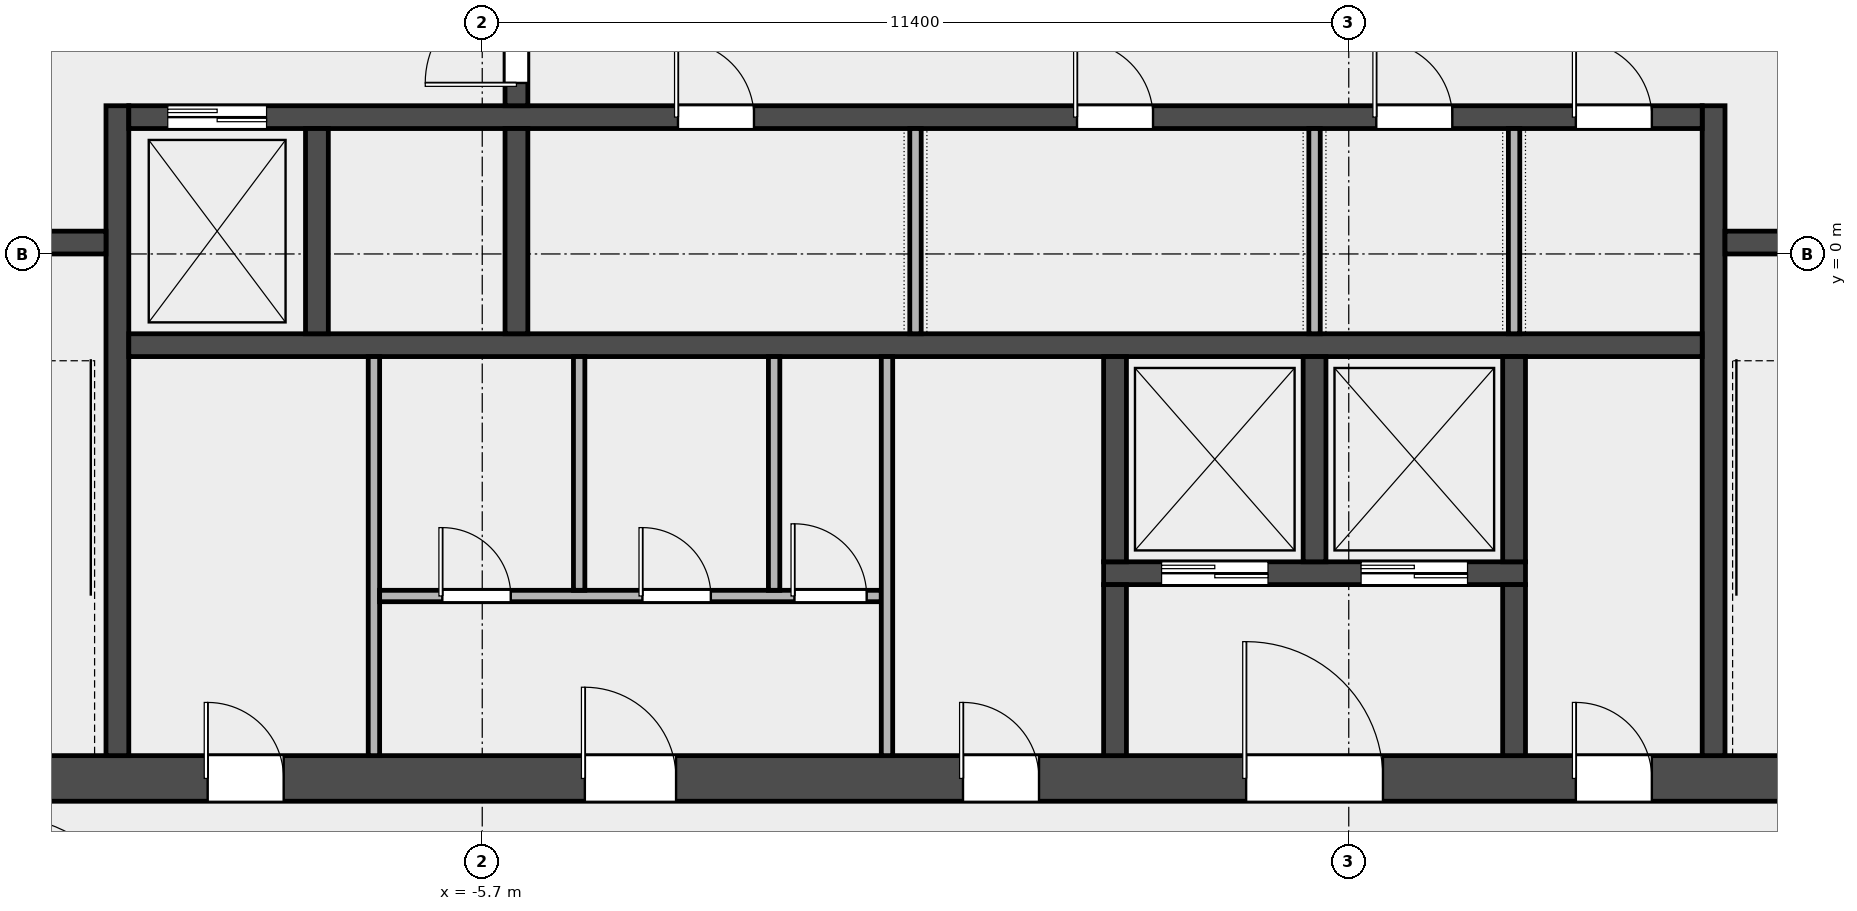
"""IFC4 building model, lengths in metres.
Left out: names, types, materials, properties, quantities, classifications, styles, units other than length and angle.
Written with IfcOpenShell. Run it as: python <this file> out.ifc"""

import sys

from ifc_helpers import new_model, si_unit, direction, frame, frame_2d, origin, place, context, subcontext, project, spatial, rectangle, extrude, element, fill, save


model = new_model("IFC4")
c1 = context("Model", 3, precision=1e-05, world=origin(), true_north=direction((0.0, 1.0)))
c2 = subcontext(c1, "Body", "Model", "MODEL_VIEW")
j1 = project(units=[si_unit("LENGTHUNIT", "METRE"), si_unit("PLANEANGLEUNIT", "RADIAN")], contexts=[c1])
p1 = place(None, origin())
s1 = spatial("IfcSite", under=j1, at=p1, CompositionType="ELEMENT")
p2 = place(p1, origin())
s2 = spatial("IfcBuilding", under=s1, at=p2, CompositionType="ELEMENT")
p3 = place(p2, frame((0.0, 0.0, 211.0)))
s3 = spatial("IfcBuildingStorey", under=s2, at=p3, CompositionType="ELEMENT", Elevation=211.0)
p4 = place(p3, frame((-14.4, -6.9, 0.0), z_axis=(0.0, 0.0, 1.0), x_axis=(1.0, 0.0, 0.0)))
e1 = element("IfcWall", 1, at=p4, inside=s3, PredefinedType="SHEAR", context=c2, shape_type="SweptSolid", body=[
    extrude(rectangle(XDim=28.8, YDim=0.6, at=frame_2d((14.4, 0.0))), origin(), (0.0, 0.0, 1.0), 3.7),
])
p5 = place(p4, frame((5.087, 0.0, 0.0)))
e2 = element("IfcOpeningElement", 2, at=p5, cuts=e1, PredefinedType="OPENING", context=c2, shape_type="SweptSolid", body=[
    extrude(rectangle(XDim=1.0, YDim=2.1, at=frame_2d((0.5, 1.05))), frame((0.0, 0.312, 0.0), z_axis=(0.0, -1.0, 0.0), x_axis=(1.0, 0.0, 0.0)), (0.0, 0.0, 1.0), 0.624),
])
p6 = place(p4, frame((10.05, 0.0, 0.0)))
e3 = element("IfcOpeningElement", 3, at=p6, cuts=e1, PredefinedType="OPENING", context=c2, shape_type="SweptSolid", body=[
    extrude(rectangle(XDim=1.2, YDim=2.1, at=frame_2d((0.6, 1.05))), frame((0.0, 0.312, 0.0), z_axis=(0.0, -1.0, 0.0), x_axis=(1.0, 0.0, 0.0)), (0.0, 0.0, 1.0), 0.624),
])
p7 = place(p4, frame((15.025, 0.0, 0.0)))
e4 = element("IfcOpeningElement", 4, at=p7, cuts=e1, PredefinedType="OPENING", context=c2, shape_type="SweptSolid", body=[
    extrude(rectangle(XDim=1.0, YDim=2.1, at=frame_2d((0.5, 1.05))), frame((0.0, 0.312, 0.0), z_axis=(0.0, -1.0, 0.0), x_axis=(1.0, 0.0, 0.0)), (0.0, 0.0, 1.0), 0.624),
])
p8 = place(p4, frame((18.75, 0.0, 0.0)))
e5 = element("IfcOpeningElement", 5, at=p8, cuts=e1, PredefinedType="OPENING", context=c2, shape_type="SweptSolid", body=[
    extrude(rectangle(XDim=1.8, YDim=2.1, at=frame_2d((0.9, 1.05))), frame((0.0, 0.312, 0.0), z_axis=(0.0, -1.0, 0.0), x_axis=(1.0, 0.0, 0.0)), (0.0, 0.0, 1.0), 0.624),
])
p9 = place(p4, frame((23.087, 0.0, 0.0)))
e6 = element("IfcOpeningElement", 6, at=p9, cuts=e1, PredefinedType="OPENING", context=c2, shape_type="SweptSolid", body=[
    extrude(rectangle(XDim=1.0, YDim=2.1, at=frame_2d((0.5, 1.05))), frame((0.0, 0.312, 0.0), z_axis=(0.0, -1.0, 0.0), x_axis=(1.0, 0.0, 0.0)), (0.0, 0.0, 1.0), 0.624),
])
for number, where, z_axis, x_axis in (
    (7, (-10.5, -6.6, 0.0), (0.0, 0.0, 1.0), (0.0, 1.0, 0.0)),
    (8, (10.5, -6.6, 0.0), (0.0, 0.0, 1.0), (0.0, 1.0, 0.0)),
):
    element("IfcWall", number, at=place(p3, frame(where, z_axis=z_axis, x_axis=x_axis)), inside=s3, PredefinedType="SHEAR", context=c2, shape_type="SweptSolid", body=[
        extrude(rectangle(XDim=8.55, YDim=0.3, at=frame_2d((4.275, 0.0))), origin(), (0.0, 0.0, 1.0), 3.7),
    ])
p10 = place(p3, frame((-13.8, 0.15, 0.0), z_axis=(0.0, 0.0, 1.0), x_axis=(1.0, 0.0, 0.0)))
e9 = element("IfcWall", 9, at=p10, inside=s3, PredefinedType="SOLIDWALL", context=c2, shape_type="SweptSolid", body=[
    extrude(rectangle(XDim=3.15, YDim=0.3, at=frame_2d((1.575, 0.0))), origin(), (0.0, 0.0, 1.0), 3.7),
])
p11 = place(p10, frame((0.975, 0.0, 0.0)))
e10 = element("IfcOpeningElement", 10, at=p11, cuts=e9, PredefinedType="OPENING", context=c2, shape_type="SweptSolid", body=[
    extrude(rectangle(XDim=1.1, YDim=2.1, at=frame_2d((0.55, 1.05))), frame((0.0, 0.162, 0.0), z_axis=(0.0, -1.0, 0.0), x_axis=(1.0, 0.0, 0.0)), (0.0, 0.0, 1.0), 0.324),
])
p12 = place(p3, frame((10.65, 0.15, 0.0), z_axis=(0.0, 0.0, 1.0), x_axis=(1.0, 0.0, 0.0)))
e11 = element("IfcWall", 11, at=p12, inside=s3, PredefinedType="SOLIDWALL", context=c2, shape_type="SweptSolid", body=[
    extrude(rectangle(XDim=3.15, YDim=0.3, at=frame_2d((1.575, 0.0))), origin(), (0.0, 0.0, 1.0), 3.7),
])
p13 = place(p12, frame((1.025, 0.0, 0.0)))
e12 = element("IfcOpeningElement", 12, at=p13, cuts=e11, PredefinedType="OPENING", context=c2, shape_type="SweptSolid", body=[
    extrude(rectangle(XDim=1.1, YDim=2.1, at=frame_2d((0.55, 1.05))), frame((0.0, 0.162, 0.0), z_axis=(0.0, -1.0, 0.0), x_axis=(1.0, 0.0, 0.0)), (0.0, 0.0, 1.0), 0.324),
])
p14 = place(p3, frame((-10.35, -1.2, 0.0), z_axis=(0.0, 0.0, 1.0), x_axis=(1.0, 0.0, 0.0)))
e13 = element("IfcWall", 13, at=p14, inside=s3, PredefinedType="SOLIDWALL", context=c2, shape_type="SweptSolid", body=[
    extrude(rectangle(XDim=20.7, YDim=0.3, at=frame_2d((10.35, 0.0))), origin(), (0.0, 0.0, 1.0), 3.7),
])
p15 = place(p3, frame((-10.35, 1.8, 0.0), z_axis=(0.0, 0.0, 1.0), x_axis=(1.0, 0.0, 0.0)))
e14 = element("IfcWall", 14, at=p15, inside=s3, PredefinedType="SOLIDWALL", context=c2, shape_type="SweptSolid", body=[
    extrude(rectangle(XDim=20.7, YDim=0.3, at=frame_2d((10.35, 0.0))), origin(), (0.0, 0.0, 1.0), 3.7),
])
p16 = place(p15, frame((0.512, 0.0, 0.0)))
e15 = element("IfcOpeningElement", 15, at=p16, cuts=e14, PredefinedType="OPENING", context=c2, shape_type="SweptSolid", body=[
    extrude(rectangle(XDim=1.3, YDim=2.1, at=frame_2d((0.65, 1.05))), frame((0.0, 0.162, 0.0), z_axis=(0.0, -1.0, 0.0), x_axis=(1.0, 0.0, 0.0)), (0.0, 0.0, 1.0), 0.324),
])
p17 = place(p15, frame((7.225, 0.0, 0.0)))
e16 = element("IfcOpeningElement", 16, at=p17, cuts=e14, PredefinedType="OPENING", context=c2, shape_type="SweptSolid", body=[
    extrude(rectangle(XDim=1.0, YDim=2.1, at=frame_2d((0.5, 1.05))), frame((0.0, 0.162, 0.0), z_axis=(0.0, -1.0, 0.0), x_axis=(1.0, 0.0, 0.0)), (0.0, 0.0, 1.0), 0.324),
])
p18 = place(p15, frame((12.475, 0.0, 0.0)))
e17 = element("IfcOpeningElement", 17, at=p18, cuts=e14, PredefinedType="OPENING", context=c2, shape_type="SweptSolid", body=[
    extrude(rectangle(XDim=1.0, YDim=2.1, at=frame_2d((0.5, 1.05))), frame((0.0, 0.162, 0.0), z_axis=(0.0, -1.0, 0.0), x_axis=(1.0, 0.0, 0.0)), (0.0, 0.0, 1.0), 0.324),
])
p19 = place(p15, frame((16.413, 0.0, 0.0)))
e18 = element("IfcOpeningElement", 18, at=p19, cuts=e14, PredefinedType="OPENING", context=c2, shape_type="SweptSolid", body=[
    extrude(rectangle(XDim=1.0, YDim=2.1, at=frame_2d((0.5, 1.05))), frame((0.0, 0.162, 0.0), z_axis=(0.0, -1.0, 0.0), x_axis=(1.0, 0.0, 0.0)), (0.0, 0.0, 1.0), 0.324),
])
p20 = place(p15, frame((19.038, 0.0, 0.0)))
e19 = element("IfcOpeningElement", 19, at=p20, cuts=e14, PredefinedType="OPENING", context=c2, shape_type="SweptSolid", body=[
    extrude(rectangle(XDim=1.0, YDim=2.1, at=frame_2d((0.5, 1.05))), frame((0.0, 0.162, 0.0), z_axis=(0.0, -1.0, 0.0), x_axis=(1.0, 0.0, 0.0)), (0.0, 0.0, 1.0), 0.324),
])
for number, where, z_axis, x_axis in (
    (20, (-7.875, -1.05, 0.0), (0.0, 0.0, 1.0), (0.0, 1.0, 0.0)),
    (21, (-5.25, -1.05, 0.0), (0.0, 0.0, 1.0), (0.0, 1.0, 0.0)),
):
    element("IfcWall", number, at=place(p3, frame(where, z_axis=z_axis, x_axis=x_axis)), inside=s3, PredefinedType="SOLIDWALL", context=c2, shape_type="SweptSolid", body=[
        extrude(rectangle(XDim=2.7, YDim=0.3, at=frame_2d((1.35, 0.0))), origin(), (0.0, 0.0, 1.0), 3.7),
    ])
p21 = place(p3, frame((-5.25, 1.95, 0.0), z_axis=(0.0, 0.0, 1.0), x_axis=(0.0, 1.0, 0.0)))
e22 = element("IfcWall", 22, at=p21, inside=s3, PredefinedType="SOLIDWALL", context=c2, shape_type="SweptSolid", body=[
    extrude(rectangle(XDim=3.3, YDim=0.3, at=frame_2d((1.65, 0.0))), origin(), (0.0, 0.0, 1.0), 3.7),
])
p22 = place(p21, frame((0.3, 0.0, 0.0)))
e23 = element("IfcOpeningElement", 23, at=p22, cuts=e22, PredefinedType="OPENING", context=c2, shape_type="SweptSolid", body=[
    extrude(rectangle(XDim=1.2, YDim=2.1, at=frame_2d((0.6, 1.05))), frame((0.0, 0.162, 0.0), z_axis=(0.0, -1.0, 0.0), x_axis=(1.0, 0.0, 0.0)), (0.0, 0.0, 1.0), 0.324),
])
p23 = place(p21, frame((1.8, 0.0, 0.0)))
e24 = element("IfcOpeningElement", 24, at=p23, cuts=e22, PredefinedType="OPENING", context=c2, shape_type="SweptSolid", body=[
    extrude(rectangle(XDim=1.2, YDim=2.1, at=frame_2d((0.6, 1.05))), frame((0.0, 0.162, 0.0), z_axis=(0.0, -1.0, 0.0), x_axis=(1.0, 0.0, 0.0)), (0.0, 0.0, 1.0), 0.324),
])
p24 = place(p3, frame((2.475, -4.2, 0.0), z_axis=(0.0, 0.0, 1.0), x_axis=(1.0, 0.0, 0.0)))
e25 = element("IfcWall", 25, at=p24, inside=s3, PredefinedType="SOLIDWALL", context=c2, shape_type="SweptSolid", body=[
    extrude(rectangle(XDim=5.55, YDim=0.3, at=frame_2d((2.775, 0.0))), origin(), (0.0, 0.0, 1.0), 3.7),
])
p25 = place(p24, frame((0.762, 0.0, 0.0)))
e26 = element("IfcOpeningElement", 26, at=p25, cuts=e25, PredefinedType="OPENING", context=c2, shape_type="SweptSolid", body=[
    extrude(rectangle(XDim=1.4, YDim=2.1, at=frame_2d((0.7, 1.05))), frame((0.0, 0.162, 0.0), z_axis=(0.0, -1.0, 0.0), x_axis=(1.0, 0.0, 0.0)), (0.0, 0.0, 1.0), 0.324),
])
p26 = place(p24, frame((3.387, 0.0, 0.0)))
e27 = element("IfcOpeningElement", 27, at=p26, cuts=e25, PredefinedType="OPENING", context=c2, shape_type="SweptSolid", body=[
    extrude(rectangle(XDim=1.4, YDim=2.1, at=frame_2d((0.7, 1.05))), frame((0.0, 0.162, 0.0), z_axis=(0.0, -1.0, 0.0), x_axis=(1.0, 0.0, 0.0)), (0.0, 0.0, 1.0), 0.324),
])
p27 = place(p3, frame((2.625, -4.05, 0.0), z_axis=(0.0, 0.0, 1.0), x_axis=(0.0, 1.0, 0.0)))
e28 = element("IfcWall", 28, at=p27, inside=s3, PredefinedType="SOLIDWALL", context=c2, shape_type="SweptSolid", body=[
    extrude(rectangle(XDim=2.7, YDim=0.3, at=frame_2d((1.35, 0.0))), origin(), (0.0, 0.0, 1.0), 3.7),
])
p28 = place(p3, frame((2.625, -6.6, 0.0), z_axis=(0.0, 0.0, 1.0), x_axis=(0.0, 1.0, 0.0)))
e29 = element("IfcWall", 29, at=p28, inside=s3, PredefinedType="SOLIDWALL", context=c2, shape_type="SweptSolid", body=[
    extrude(rectangle(XDim=2.25, YDim=0.3, at=frame_2d((1.125, 0.0))), origin(), (0.0, 0.0, 1.0), 3.7),
])
for number, where, z_axis, x_axis in (
    (30, (5.25, -4.05, 0.0), (0.0, 0.0, 1.0), (0.0, 1.0, 0.0)),
    (31, (7.875, -4.05, 0.0), (0.0, 0.0, 1.0), (0.0, 1.0, 0.0)),
):
    element("IfcWall", number, at=place(p3, frame(where, z_axis=z_axis, x_axis=x_axis)), inside=s3, PredefinedType="SOLIDWALL", context=c2, shape_type="SweptSolid", body=[
        extrude(rectangle(XDim=2.7, YDim=0.3, at=frame_2d((1.35, 0.0))), origin(), (0.0, 0.0, 1.0), 3.7),
    ])
p29 = place(p3, frame((7.875, -6.6, 0.0), z_axis=(0.0, 0.0, 1.0), x_axis=(0.0, 1.0, 0.0)))
e32 = element("IfcWall", 32, at=p29, inside=s3, PredefinedType="SOLIDWALL", context=c2, shape_type="SweptSolid", body=[
    extrude(rectangle(XDim=2.25, YDim=0.3, at=frame_2d((1.125, 0.0))), origin(), (0.0, 0.0, 1.0), 3.7),
])
p30 = place(p3, frame((-7.125, -6.6, 0.0), z_axis=(0.0, 0.0, 1.0), x_axis=(0.0, 1.0, 0.0)))
e33 = element("IfcWall", 33, at=p30, inside=s3, PredefinedType="PARTITIONING", context=c2, shape_type="SweptSolid", body=[
    extrude(rectangle(XDim=5.25, YDim=0.15, at=frame_2d((2.625, 0.0))), origin(), (0.0, 0.0, 1.0), 3.7),
])
p31 = place(p3, frame((-7.05, -4.5, 0.0), z_axis=(0.0, 0.0, 1.0), x_axis=(1.0, 0.0, 0.0)))
e34 = element("IfcWall", 34, at=p31, inside=s3, PredefinedType="PARTITIONING", context=c2, shape_type="SweptSolid", body=[
    extrude(rectangle(XDim=6.6, YDim=0.15, at=frame_2d((3.3, 0.0))), origin(), (0.0, 0.0, 1.0), 3.7),
])
p32 = place(p31, frame((0.825, 0.0, 0.0)))
e35 = element("IfcOpeningElement", 35, at=p32, cuts=e34, PredefinedType="OPENING", context=c2, shape_type="SweptSolid", body=[
    extrude(rectangle(XDim=0.9, YDim=2.1, at=frame_2d((0.45, 1.05))), frame((0.0, 0.087, 0.0), z_axis=(0.0, -1.0, 0.0), x_axis=(1.0, 0.0, 0.0)), (0.0, 0.0, 1.0), 0.174),
])
p33 = place(p31, frame((3.458, 0.0, 0.0)))
e36 = element("IfcOpeningElement", 36, at=p33, cuts=e34, PredefinedType="OPENING", context=c2, shape_type="SweptSolid", body=[
    extrude(rectangle(XDim=0.9, YDim=2.1, at=frame_2d((0.45, 1.05))), frame((0.0, 0.087, 0.0), z_axis=(0.0, -1.0, 0.0), x_axis=(1.0, 0.0, 0.0)), (0.0, 0.0, 1.0), 0.174),
])
p34 = place(p31, frame((5.458, 0.0, 0.0)))
e37 = element("IfcOpeningElement", 37, at=p34, cuts=e34, PredefinedType="OPENING", context=c2, shape_type="SweptSolid", body=[
    extrude(rectangle(XDim=0.95, YDim=2.1, at=frame_2d((0.475, 1.05))), frame((0.0, 0.087, 0.0), z_axis=(0.0, -1.0, 0.0), x_axis=(1.0, 0.0, 0.0)), (0.0, 0.0, 1.0), 0.174),
])
for number, where, z_axis, x_axis in (
    (38, (-4.425, -4.425, 0.0), (0.0, 0.0, 1.0), (0.0, 1.0, 0.0)),
    (39, (-1.86, -4.425, 0.0), (0.0, 0.0, 1.0), (0.0, 1.0, 0.0)),
):
    element("IfcWall", number, at=place(p3, frame(where, z_axis=z_axis, x_axis=x_axis)), inside=s3, PredefinedType="PARTITIONING", context=c2, shape_type="SweptSolid", body=[
        extrude(rectangle(XDim=3.075, YDim=0.15, at=frame_2d((1.538, 0.0))), origin(), (0.0, 0.0, 1.0), 3.7),
    ])
p35 = place(p3, frame((-0.375, -6.6, 0.0), z_axis=(0.0, 0.0, 1.0), x_axis=(0.0, 1.0, 0.0)))
e40 = element("IfcWall", 40, at=p35, inside=s3, PredefinedType="PARTITIONING", context=c2, shape_type="SweptSolid", body=[
    extrude(rectangle(XDim=5.25, YDim=0.15, at=frame_2d((2.625, 0.0))), origin(), (0.0, 0.0, 1.0), 3.7),
])
for number, where, z_axis, x_axis in (
    (41, (0.0, -1.05, 0.0), (0.0, 0.0, 1.0), (0.0, 1.0, 0.0)),
    (42, (5.25, -1.05, 0.0), (0.0, 0.0, 1.0), (0.0, 1.0, 0.0)),
    (43, (7.875, -1.05, 0.0), (0.0, 0.0, 1.0), (0.0, 1.0, 0.0)),
):
    element("IfcWall", number, at=place(p3, frame(where, z_axis=z_axis, x_axis=x_axis)), inside=s3, PredefinedType="PARTITIONING", context=c2, shape_type="SweptSolid", body=[
        extrude(rectangle(XDim=2.7, YDim=0.15, at=frame_2d((1.35, 0.0))), origin(), (0.0, 0.0, 1.0), 3.7),
    ])
p36 = place(p22, origin())
e44 = element("IfcDoor", 44, at=p36, inside=s3, OperationType="SINGLE_SWING_LEFT", PredefinedType="DOOR", context=c2, shape_type="SweptSolid", body=[
    extrude(rectangle(XDim=1.2, YDim=2.1, at=frame_2d((0.6, 1.05))), frame((0.0, 0.025, 0.0), z_axis=(0.0, -1.0, 0.0), x_axis=(1.0, 0.0, 0.0)), (0.0, 0.0, 1.0), 0.05),
])
fill(e23, e44)
p37 = place(p16, origin())
e45 = element("IfcDoor", 45, at=p37, inside=s3, OperationType="DOUBLE_DOOR_SLIDING", PredefinedType="DOOR", context=c2, shape_type="SweptSolid", body=[
    extrude(rectangle(XDim=1.3, YDim=2.1, at=frame_2d((0.65, 1.05))), frame((0.0, 0.025, 0.0), z_axis=(0.0, -1.0, 0.0), x_axis=(1.0, 0.0, 0.0)), (0.0, 0.0, 1.0), 0.05),
])
fill(e15, e45)
p38 = place(p25, origin())
e46 = element("IfcDoor", 46, at=p38, inside=s3, OperationType="DOUBLE_DOOR_SLIDING", PredefinedType="DOOR", context=c2, shape_type="SweptSolid", body=[
    extrude(rectangle(XDim=1.4, YDim=2.1, at=frame_2d((0.7, 1.05))), frame((0.0, 0.025, 0.0), z_axis=(0.0, -1.0, 0.0), x_axis=(1.0, 0.0, 0.0)), (0.0, 0.0, 1.0), 0.05),
])
fill(e26, e46)
p39 = place(p26, origin())
e47 = element("IfcDoor", 47, at=p39, inside=s3, OperationType="DOUBLE_DOOR_SLIDING", PredefinedType="DOOR", context=c2, shape_type="SweptSolid", body=[
    extrude(rectangle(XDim=1.4, YDim=2.1, at=frame_2d((0.7, 1.05))), frame((0.0, 0.025, 0.0), z_axis=(0.0, -1.0, 0.0), x_axis=(1.0, 0.0, 0.0)), (0.0, 0.0, 1.0), 0.05),
])
fill(e27, e47)
p40 = place(p5, origin())
e48 = element("IfcDoor", 48, at=p40, inside=s3, OperationType="SINGLE_SWING_LEFT", PredefinedType="DOOR", context=c2, shape_type="SweptSolid", body=[
    extrude(rectangle(XDim=1.0, YDim=2.1, at=frame_2d((0.5, 1.05))), frame((0.0, 0.025, 0.0), z_axis=(0.0, -1.0, 0.0), x_axis=(1.0, 0.0, 0.0)), (0.0, 0.0, 1.0), 0.05),
])
fill(e2, e48)
p41 = place(p6, origin())
e49 = element("IfcDoor", 49, at=p41, inside=s3, OperationType="SINGLE_SWING_LEFT", PredefinedType="DOOR", context=c2, shape_type="SweptSolid", body=[
    extrude(rectangle(XDim=1.2, YDim=2.1, at=frame_2d((0.6, 1.05))), frame((0.0, 0.025, 0.0), z_axis=(0.0, -1.0, 0.0), x_axis=(1.0, 0.0, 0.0)), (0.0, 0.0, 1.0), 0.05),
])
fill(e3, e49)
p42 = place(p32, origin())
e50 = element("IfcDoor", 50, at=p42, inside=s3, OperationType="SINGLE_SWING_LEFT", PredefinedType="DOOR", context=c2, shape_type="SweptSolid", body=[
    extrude(rectangle(XDim=0.9, YDim=2.1, at=frame_2d((0.45, 1.05))), frame((0.0, 0.025, 0.0), z_axis=(0.0, -1.0, 0.0), x_axis=(1.0, 0.0, 0.0)), (0.0, 0.0, 1.0), 0.05),
])
fill(e35, e50)
p43 = place(p33, origin())
e51 = element("IfcDoor", 51, at=p43, inside=s3, OperationType="SINGLE_SWING_LEFT", PredefinedType="DOOR", context=c2, shape_type="SweptSolid", body=[
    extrude(rectangle(XDim=0.9, YDim=2.1, at=frame_2d((0.45, 1.05))), frame((0.0, 0.025, 0.0), z_axis=(0.0, -1.0, 0.0), x_axis=(1.0, 0.0, 0.0)), (0.0, 0.0, 1.0), 0.05),
])
fill(e36, e51)
p44 = place(p34, origin())
e52 = element("IfcDoor", 52, at=p44, inside=s3, OperationType="SINGLE_SWING_LEFT", PredefinedType="DOOR", context=c2, shape_type="SweptSolid", body=[
    extrude(rectangle(XDim=0.95, YDim=2.1, at=frame_2d((0.475, 1.05))), frame((0.0, 0.025, 0.0), z_axis=(0.0, -1.0, 0.0), x_axis=(1.0, 0.0, 0.0)), (0.0, 0.0, 1.0), 0.05),
])
fill(e37, e52)
p45 = place(p7, origin())
e53 = element("IfcDoor", 53, at=p45, inside=s3, OperationType="SINGLE_SWING_LEFT", PredefinedType="DOOR", context=c2, shape_type="SweptSolid", body=[
    extrude(rectangle(XDim=1.0, YDim=2.1, at=frame_2d((0.5, 1.05))), frame((0.0, 0.025, 0.0), z_axis=(0.0, -1.0, 0.0), x_axis=(1.0, 0.0, 0.0)), (0.0, 0.0, 1.0), 0.05),
])
fill(e4, e53)
p46 = place(p8, origin())
e54 = element("IfcDoor", 54, at=p46, inside=s3, OperationType="DOUBLE_DOOR_SINGLE_SWING", PredefinedType="DOOR", context=c2, shape_type="SweptSolid", body=[
    extrude(rectangle(XDim=1.8, YDim=2.1, at=frame_2d((0.9, 1.05))), frame((0.0, 0.025, 0.0), z_axis=(0.0, -1.0, 0.0), x_axis=(1.0, 0.0, 0.0)), (0.0, 0.0, 1.0), 0.05),
])
fill(e5, e54)
p47 = place(p9, origin())
e55 = element("IfcDoor", 55, at=p47, inside=s3, OperationType="SINGLE_SWING_LEFT", PredefinedType="DOOR", context=c2, shape_type="SweptSolid", body=[
    extrude(rectangle(XDim=1.0, YDim=2.1, at=frame_2d((0.5, 1.05))), frame((0.0, 0.025, 0.0), z_axis=(0.0, -1.0, 0.0), x_axis=(1.0, 0.0, 0.0)), (0.0, 0.0, 1.0), 0.05),
])
fill(e6, e55)
p48 = place(p17, origin())
e56 = element("IfcDoor", 56, at=p48, inside=s3, OperationType="SINGLE_SWING_LEFT", PredefinedType="DOOR", context=c2, shape_type="SweptSolid", body=[
    extrude(rectangle(XDim=1.0, YDim=2.1, at=frame_2d((0.5, 1.05))), frame((0.0, 0.025, 0.0), z_axis=(0.0, -1.0, 0.0), x_axis=(1.0, 0.0, 0.0)), (0.0, 0.0, 1.0), 0.05),
])
fill(e16, e56)
p49 = place(p18, origin())
e57 = element("IfcDoor", 57, at=p49, inside=s3, OperationType="SINGLE_SWING_LEFT", PredefinedType="DOOR", context=c2, shape_type="SweptSolid", body=[
    extrude(rectangle(XDim=1.0, YDim=2.1, at=frame_2d((0.5, 1.05))), frame((0.0, 0.025, 0.0), z_axis=(0.0, -1.0, 0.0), x_axis=(1.0, 0.0, 0.0)), (0.0, 0.0, 1.0), 0.05),
])
fill(e17, e57)
p50 = place(p19, origin())
e58 = element("IfcDoor", 58, at=p50, inside=s3, OperationType="SINGLE_SWING_LEFT", PredefinedType="DOOR", context=c2, shape_type="SweptSolid", body=[
    extrude(rectangle(XDim=1.0, YDim=2.1, at=frame_2d((0.5, 1.05))), frame((0.0, 0.025, 0.0), z_axis=(0.0, -1.0, 0.0), x_axis=(1.0, 0.0, 0.0)), (0.0, 0.0, 1.0), 0.05),
])
fill(e18, e58)
p51 = place(p20, origin())
e59 = element("IfcDoor", 59, at=p51, inside=s3, OperationType="SINGLE_SWING_LEFT", PredefinedType="DOOR", context=c2, shape_type="SweptSolid", body=[
    extrude(rectangle(XDim=1.0, YDim=2.1, at=frame_2d((0.5, 1.05))), frame((0.0, 0.025, 0.0), z_axis=(0.0, -1.0, 0.0), x_axis=(1.0, 0.0, 0.0)), (0.0, 0.0, 1.0), 0.05),
])
fill(e19, e59)
save(model, sys.argv[1])
